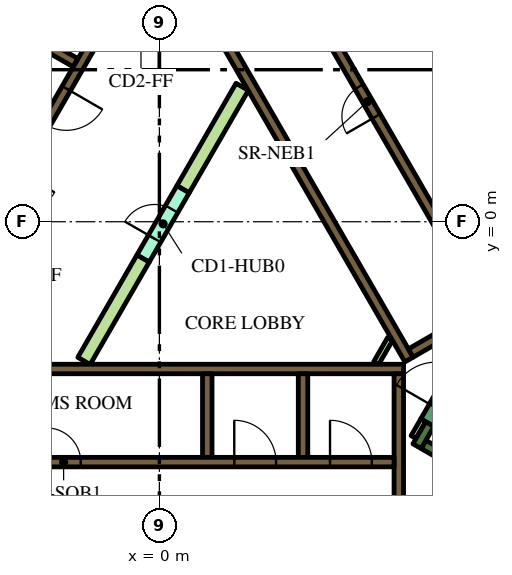
"""IFC4 building model, lengths in metres.
Left out: names, types, materials, properties, quantities, classifications, styles, units other than length and angle.
Written with IfcOpenShell. Run it as: python <this file> out.ifc"""

import sys

from ifc_helpers import new_model, si_unit, direction, frame, frame_2d, origin, place, context, subcontext, project, spatial, polyline, rectangle, outline, extrude, element, fill, save


model = new_model("IFC4")
c1 = context("Model", 3, precision=1e-05, world=origin(), true_north=direction((0.0, 1.0)))
c2 = subcontext(c1, "Body", "Model", "MODEL_VIEW")
j1 = project(units=[si_unit("LENGTHUNIT", "METRE"), si_unit("PLANEANGLEUNIT", "RADIAN")], contexts=[c1])
p1 = place(None, origin())
s1 = spatial("IfcSite", under=j1, at=p1, CompositionType="ELEMENT")
p2 = place(p1, origin())
s2 = spatial("IfcBuilding", under=s1, at=p2, CompositionType="ELEMENT")
p3 = place(p2, frame((0.0, 0.0, 103.2)))
s3 = spatial("IfcBuildingStorey", under=s2, at=p3, CompositionType="ELEMENT", Elevation=103.2)
p4 = place(p3, frame((6.711, 13.476, 0.0), z_axis=(0.0, 0.0, 1.0), x_axis=(0.500002723396, -0.866023831425, 0.0)))
e1 = element("IfcWall", 1, at=p4, inside=s3, PredefinedType="SOLIDWALL", context=c2, shape_type="SweptSolid", body=[
    extrude(rectangle(XDim=20.334, YDim=0.9, at=frame_2d((10.167, 0.0))), origin(), (0.0, 0.0, 1.0), 3.9),
])
p5 = place(p3, frame((12.84, -9.261, 0.0), z_axis=(0.0, 0.0, 1.0), x_axis=(-0.866013990052, 0.500019768644, 0.0)))
e2 = element("IfcWall", 2, at=p5, inside=s3, PredefinedType="SOLIDWALL", context=c2, shape_type="SweptSolid", body=[
    extrude(rectangle(XDim=6.8, YDim=0.25, at=frame_2d((3.4, 0.0))), origin(), (0.0, 0.0, 1.0), 3.9),
])
p6 = place(p3, frame((6.78, -5.906, 0.0), z_axis=(0.0, 0.0, 1.0), x_axis=(0.500223362819, 0.865896406789, 0.0)))
e3 = element("IfcWall", 3, at=p6, inside=s3, PredefinedType="SOLIDWALL", context=c2, shape_type="SweptSolid", body=[
    extrude(rectangle(XDim=0.675, YDim=0.25, at=frame_2d((0.337, 0.0))), origin(), (0.0, 0.0, 1.0), 3.9),
])
p7 = place(p3, frame((-5.545, -3.875, 0.0), z_axis=(0.0, 0.0, 1.0), x_axis=(1.0, 0.0, 0.0)))
e4 = element("IfcWall", 4, at=p7, inside=s3, PredefinedType="SOLIDWALL", context=c2, shape_type="SweptSolid", body=[
    extrude(rectangle(XDim=11.97, YDim=0.25, at=frame_2d((5.985, 0.0))), origin(), (0.0, 0.0, 1.0), 3.9),
])
p8 = place(p3, frame((6.3, -7.268, 0.0), z_axis=(0.0, 0.0, 1.0), x_axis=(0.0, 1.0, 0.0)))
e5 = element("IfcWall", 5, at=p8, inside=s3, PredefinedType="SOLIDWALL", context=c2, shape_type="SweptSolid", body=[
    extrude(rectangle(XDim=3.268, YDim=0.25, at=frame_2d((1.634, 0.0))), origin(), (0.0, 0.0, 1.0), 3.9),
])
for number, where, z_axis, x_axis in (
    (6, (3.78, -4.0, 0.0), (0.0, 0.0, 1.0), (0.0, -1.0, 0.0)),
    (7, (1.26, -4.0, 0.0), (0.0, 0.0, 1.0), (0.0, -1.0, 0.0)),
):
    element("IfcWall", number, at=place(p3, frame(where, z_axis=z_axis, x_axis=x_axis)), inside=s3, PredefinedType="SOLIDWALL", context=c2, shape_type="SweptSolid", body=[
        extrude(rectangle(XDim=2.2, YDim=0.25, at=frame_2d((1.1, 0.0))), origin(), (0.0, 0.0, 1.0), 3.9),
    ])
p9 = place(p3, origin())
e8 = element("IfcWall", 8, at=p9, inside=s3, PredefinedType="SOLIDWALL", context=c2, shape_type="SweptSolid", body=[
    extrude(outline(polyline([(0.566, 6.725), (0.566, 6.875), (0.566, 6.875), (0.565, 6.875), (0.361, 6.875), (0.035, 7.439), (0.252, 7.564), (0.377, 7.348), (6.552, -3.348), (6.677, -3.564), (6.46, -3.689), (0.448, 6.725), (0.565, 6.725), (0.566, 6.725), (0.566, 6.725)])), origin(), (0.0, 0.0, 1.0), 3.9),
])
p10 = place(p3, frame((6.614, -3.456, 0.0), z_axis=(0.0, 0.0, 1.0), x_axis=(0.86602447079, 0.500001615989, 0.0)))
e9 = element("IfcWall", 9, at=p10, inside=s3, PredefinedType="SOLIDWALL", context=c2, shape_type="SweptSolid", body=[
    extrude(rectangle(XDim=3.154, YDim=0.25, at=frame_2d((1.577, 0.0))), origin(), (0.0, 0.0, 1.0), 3.9),
])
p11 = place(p3, frame((-8.06, -1.311, 0.0), z_axis=(0.0, 0.0, 1.0), x_axis=(0.50000273126, 0.866023826885, 0.0)))
e10 = element("IfcWall", 10, at=p11, inside=s3, PredefinedType="SOLIDWALL", context=c2, shape_type="SweptSolid", body=[
    extrude(rectangle(XDim=10.33, YDim=0.25, at=frame_2d((5.165, 0.0))), origin(), (0.0, 0.0, 1.0), 3.9),
])
p12 = place(p3, frame((-2.204, 4.182, 0.0), z_axis=(0.0, 0.0, 1.0), x_axis=(-0.866008176907, 0.50002983664, 0.0)))
e11 = element("IfcWall", 11, at=p12, inside=s3, PredefinedType="SOLIDWALL", context=c2, shape_type="SweptSolid", body=[
    extrude(rectangle(XDim=2.2, YDim=0.25, at=frame_2d((1.1, 0.0))), origin(), (0.0, 0.0, 1.0), 3.9),
])
p13 = place(p3, frame((6.945, -5.222, 0.0), z_axis=(0.0, 0.0, 1.0), x_axis=(-0.499818422106, -0.866130212453, 0.0)))
e12 = element("IfcWall", 12, at=p13, inside=s3, PredefinedType="PARTITIONING", context=c2, shape_type="SweptSolid", body=[
    extrude(rectangle(XDim=0.514, YDim=0.15, at=frame_2d((0.257, 0.0))), origin(), (0.0, 0.0, 1.0), 2.75),
])
p14 = place(p3, frame((5.705, -3.718, 0.0), z_axis=(0.0, 0.0, 1.0), x_axis=(0.499962090823, 0.866047289552, 0.0)))
e13 = element("IfcWall", 13, at=p14, inside=s3, PredefinedType="PARTITIONING", context=c2, shape_type="SweptSolid", body=[
    extrude(rectangle(XDim=0.735, YDim=0.15, at=frame_2d((0.367, 0.0))), origin(), (0.0, 0.0, 1.0), 2.75),
])
e14 = element("IfcWall", 14, at=p9, inside=s3, PredefinedType="PARTITIONING", context=c2, shape_type="SweptSolid", body=[
    extrude(outline(polyline([(-0.59, -0.872), (-0.265, -1.059), (-1.822, -3.756), (-2.147, -3.568), (-0.59, -0.872)])), origin(), (0.0, 0.0, 1.0), 2.75),
])
e15 = element("IfcWall", 15, at=p9, inside=s3, PredefinedType="PARTITIONING", context=c2, shape_type="SweptSolid", body=[
    extrude(outline(polyline([(2.017, 3.643), (2.342, 3.456), (0.785, 0.76), (0.46, 0.947), (2.017, 3.643)])), origin(), (0.0, 0.0, 1.0), 2.75),
])
p15 = place(p3, frame((-6.175, -6.325, 0.0), z_axis=(0.0, 0.0, 1.0), x_axis=(1.0, 0.0, 0.0)))
e16 = element("IfcWall", 16, at=p15, inside=s3, PredefinedType="SOLIDWALL", context=c2, shape_type="SweptSolid", body=[
    extrude(rectangle(XDim=12.35, YDim=0.25, at=frame_2d((6.175, 0.0))), origin(), (0.0, 0.0, 1.0), 3.9),
])
p16 = place(p15, frame((3.205, 0.0, 0.0)))
e17 = element("IfcOpeningElement", 17, at=p16, cuts=e16, PredefinedType="OPENING", context=c2, shape_type="SweptSolid", body=[
    extrude(rectangle(XDim=0.9, YDim=2.1, at=frame_2d((0.45, 1.05))), frame((0.0, 0.135, 0.0), z_axis=(0.0, -1.0, 0.0), x_axis=(1.0, 0.0, 0.0)), (0.0, 0.0, 1.0), 0.27),
])
p17 = place(p15, frame((8.145, 0.0, 0.0)))
e18 = element("IfcOpeningElement", 18, at=p17, cuts=e16, PredefinedType="OPENING", context=c2, shape_type="SweptSolid", body=[
    extrude(rectangle(XDim=1.1, YDim=2.1, at=frame_2d((0.55, 1.05))), frame((0.0, 0.135, 0.0), z_axis=(0.0, -1.0, 0.0), x_axis=(1.0, 0.0, 0.0)), (0.0, 0.0, 1.0), 0.27),
])
p18 = place(p15, frame((10.665, 0.0, 0.0)))
e19 = element("IfcOpeningElement", 19, at=p18, cuts=e16, PredefinedType="OPENING", context=c2, shape_type="SweptSolid", body=[
    extrude(rectangle(XDim=1.1, YDim=2.1, at=frame_2d((0.55, 1.05))), frame((0.0, 0.135, 0.0), z_axis=(0.0, -1.0, 0.0), x_axis=(1.0, 0.0, 0.0)), (0.0, 0.0, 1.0), 0.27),
])
p19 = place(p3, frame((11.553, -0.46, 0.0), z_axis=(0.0, 0.0, 1.0), x_axis=(-0.500006514828, 0.866021642414, 0.0)))
e20 = element("IfcWall", 20, at=p19, inside=s3, PredefinedType="SOLIDWALL", context=c2, shape_type="SweptSolid", body=[
    extrude(rectangle(XDim=12.35, YDim=0.25, at=frame_2d((6.175, 0.0))), origin(), (0.0, 0.0, 1.0), 3.9),
])
p20 = place(p19, frame((0.585, 0.0, 0.0)))
e21 = element("IfcOpeningElement", 21, at=p20, cuts=e20, PredefinedType="OPENING", context=c2, shape_type="SweptSolid", body=[
    extrude(rectangle(XDim=1.1, YDim=2.1, at=frame_2d((0.55, 1.05))), frame((0.0, 0.135, 0.0), z_axis=(0.0, -1.0, 0.0), x_axis=(1.0, 0.0, 0.0)), (0.0, 0.0, 1.0), 0.27),
])
p21 = place(p19, frame((3.105, 0.0, 0.0)))
e22 = element("IfcOpeningElement", 22, at=p21, cuts=e20, PredefinedType="OPENING", context=c2, shape_type="SweptSolid", body=[
    extrude(rectangle(XDim=1.1, YDim=2.1, at=frame_2d((0.55, 1.05))), frame((0.0, 0.135, 0.0), z_axis=(0.0, -1.0, 0.0), x_axis=(1.0, 0.0, 0.0)), (0.0, 0.0, 1.0), 0.27),
])
p22 = place(p19, frame((5.625, 0.0, 0.0)))
e23 = element("IfcOpeningElement", 23, at=p22, cuts=e20, PredefinedType="OPENING", context=c2, shape_type="SweptSolid", body=[
    extrude(rectangle(XDim=1.1, YDim=2.1, at=frame_2d((0.55, 1.05))), frame((0.0, 0.135, 0.0), z_axis=(0.0, -1.0, 0.0), x_axis=(1.0, 0.0, 0.0)), (0.0, 0.0, 1.0), 0.27),
])
p23 = place(p3, frame((8.565, -2.185, 0.0), z_axis=(0.0, 0.0, 1.0), x_axis=(-0.499997954832, 0.866026584559, 0.0)))
e24 = element("IfcWall", 24, at=p23, inside=s3, PredefinedType="SOLIDWALL", context=c2, shape_type="SweptSolid", body=[
    extrude(rectangle(XDim=12.35, YDim=0.25, at=frame_2d((6.175, 0.0))), origin(), (0.0, 0.0, 1.0), 3.9),
])
p24 = place(p23, frame((5.725, 0.0, 0.0)))
e25 = element("IfcOpeningElement", 25, at=p24, cuts=e24, PredefinedType="OPENING", context=c2, shape_type="SweptSolid", body=[
    extrude(rectangle(XDim=0.9, YDim=2.1, at=frame_2d((0.45, 1.05))), frame((0.0, 0.135, 0.0), z_axis=(0.0, -1.0, 0.0), x_axis=(1.0, 0.0, 0.0)), (0.0, 0.0, 1.0), 0.27),
])
p25 = place(p3, frame((-0.898, 6.194, 0.0), z_axis=(0.0, 0.0, 1.0), x_axis=(-0.499996202215, -0.866027596426, 0.0)))
e26 = element("IfcWall", 26, at=p25, inside=s3, PredefinedType="SOLIDWALL", context=c2, shape_type="SweptSolid", body=[
    extrude(rectangle(XDim=9.83, YDim=0.25, at=frame_2d((4.915, 0.0))), origin(), (0.0, 0.0, 1.0), 3.9),
])
p26 = place(p25, frame((0.585, 0.0, 0.0)))
e27 = element("IfcOpeningElement", 27, at=p26, cuts=e26, PredefinedType="OPENING", context=c2, shape_type="SweptSolid", body=[
    extrude(rectangle(XDim=1.1, YDim=2.1, at=frame_2d((0.55, 1.05))), frame((0.0, 0.135, 0.0), z_axis=(0.0, -1.0, 0.0), x_axis=(1.0, 0.0, 0.0)), (0.0, 0.0, 1.0), 0.27),
])
p27 = place(p25, frame((3.105, 0.0, 0.0)))
e28 = element("IfcOpeningElement", 28, at=p27, cuts=e26, PredefinedType="OPENING", context=c2, shape_type="SweptSolid", body=[
    extrude(rectangle(XDim=1.1, YDim=2.1, at=frame_2d((0.55, 1.05))), frame((0.0, 0.135, 0.0), z_axis=(0.0, -1.0, 0.0), x_axis=(1.0, 0.0, 0.0)), (0.0, 0.0, 1.0), 0.27),
])
p28 = place(p25, frame((5.625, 0.0, 0.0)))
e29 = element("IfcOpeningElement", 29, at=p28, cuts=e26, PredefinedType="OPENING", context=c2, shape_type="SweptSolid", body=[
    extrude(rectangle(XDim=1.1, YDim=2.1, at=frame_2d((0.55, 1.05))), frame((0.0, 0.135, 0.0), z_axis=(0.0, -1.0, 0.0), x_axis=(1.0, 0.0, 0.0)), (0.0, 0.0, 1.0), 0.27),
])
p29 = place(p25, frame((8.145, 0.0, 0.0)))
e30 = element("IfcOpeningElement", 30, at=p29, cuts=e26, PredefinedType="OPENING", context=c2, shape_type="SweptSolid", body=[
    extrude(rectangle(XDim=1.1, YDim=2.1, at=frame_2d((0.55, 1.05))), frame((0.0, 0.135, 0.0), z_axis=(0.0, -1.0, 0.0), x_axis=(1.0, 0.0, 0.0)), (0.0, 0.0, 1.0), 0.27),
])
p30 = place(p3, frame((7.053, -5.284, 0.0), z_axis=(0.0, 0.0, 1.0), x_axis=(0.500078061341, 0.865980330357, 0.0)))
e31 = element("IfcWall", 31, at=p30, inside=s3, PredefinedType="SOLIDWALL", context=c2, shape_type="SweptSolid", body=[
    extrude(rectangle(XDim=2.1, YDim=0.4, at=frame_2d((1.05, 0.0))), origin(), (0.0, 0.0, 1.0), 3.9),
])
p31 = place(p30, frame((0.45, 0.0, 0.0)))
e32 = element("IfcOpeningElement", 32, at=p31, cuts=e31, PredefinedType="OPENING", context=c2, shape_type="SweptSolid", body=[
    extrude(rectangle(XDim=1.2, YDim=2.1, at=frame_2d((0.6, 1.05))), frame((0.0, 0.21, 0.0), z_axis=(0.0, -1.0, 0.0), x_axis=(1.0, 0.0, 0.0)), (0.0, 0.0, 1.0), 0.42),
])
p32 = place(p3, frame((-0.427, -0.966, 0.0), z_axis=(0.0, 0.0, 1.0), x_axis=(0.49994051562, 0.866059744384, 0.0)))
e33 = element("IfcWall", 33, at=p32, inside=s3, PredefinedType="PARTITIONING", context=c2, shape_type="SweptSolid", body=[
    extrude(rectangle(XDim=2.1, YDim=0.375, at=frame_2d((1.05, 0.0))), origin(), (0.0, 0.0, 1.0), 2.75),
])
p33 = place(p32, frame((0.6, 0.0, 0.0)))
e34 = element("IfcOpeningElement", 34, at=p33, cuts=e33, PredefinedType="OPENING", context=c2, shape_type="SweptSolid", body=[
    extrude(rectangle(XDim=0.9, YDim=2.1, at=frame_2d((0.45, 1.05))), frame((0.0, 0.198, 0.0), z_axis=(0.0, -1.0, 0.0), x_axis=(1.0, 0.0, 0.0)), (0.0, 0.0, 1.0), 0.395),
])
p34 = place(p3, frame((6.163, 18.475, 0.0), z_axis=(0.0, 0.0, 1.0), x_axis=(0.500001317485, -0.866024643133, 0.0)))
e35 = element("IfcWall", 35, at=p34, inside=s3, PredefinedType="PARTITIONING", context=c2, shape_type="SweptSolid", body=[
    extrude(rectangle(XDim=25.767, YDim=0.15, at=frame_2d((12.883, 0.0))), origin(), (0.0, 0.0, 1.0), 2.75),
])
p35 = place(p34, frame((24.241, 0.0, 0.0)))
e36 = element("IfcOpeningElement", 36, at=p35, cuts=e35, PredefinedType="OPENING", context=c2, shape_type="SweptSolid", body=[
    extrude(rectangle(XDim=1.0, YDim=2.1, at=frame_2d((0.5, 1.05))), frame((0.0, 0.085, 0.0), z_axis=(0.0, -1.0, 0.0), x_axis=(1.0, 0.0, 0.0)), (0.0, 0.0, 1.0), 0.17),
])
p36 = place(p34, frame((13.144, 0.0, 0.0)))
e37 = element("IfcOpeningElement", 37, at=p36, cuts=e35, PredefinedType="OPENING", context=c2, shape_type="SweptSolid", body=[
    extrude(rectangle(XDim=1.0, YDim=2.1, at=frame_2d((0.5, 1.05))), frame((0.0, 0.085, 0.0), z_axis=(0.0, -1.0, 0.0), x_axis=(1.0, 0.0, 0.0)), (0.0, 0.0, 1.0), 0.17),
])
p37 = place(p34, frame((11.592, 0.0, 0.0)))
e38 = element("IfcOpeningElement", 38, at=p37, cuts=e35, PredefinedType="OPENING", context=c2, shape_type="SweptSolid", body=[
    extrude(rectangle(XDim=1.1, YDim=2.1, at=frame_2d((0.55, 1.05))), frame((0.0, 0.085, 0.0), z_axis=(0.0, -1.0, 0.0), x_axis=(1.0, 0.0, 0.0)), (0.0, 0.0, 1.0), 0.17),
])
p38 = place(p34, frame((4.674, 0.0, 0.0)))
e39 = element("IfcOpeningElement", 39, at=p38, cuts=e35, PredefinedType="OPENING", context=c2, shape_type="SweptSolid", body=[
    extrude(rectangle(XDim=0.9, YDim=2.1, at=frame_2d((0.45, 1.05))), frame((0.0, 0.085, 0.0), z_axis=(0.0, -1.0, 0.0), x_axis=(1.0, 0.0, 0.0)), (0.0, 0.0, 1.0), 0.17),
])
p39 = place(p34, frame((2.411, 0.0, 0.0)))
e40 = element("IfcOpeningElement", 40, at=p39, cuts=e35, PredefinedType="OPENING", context=c2, shape_type="SweptSolid", body=[
    extrude(rectangle(XDim=1.0, YDim=2.1, at=frame_2d((0.5, 1.05))), frame((0.0, 0.085, 0.0), z_axis=(0.0, -1.0, 0.0), x_axis=(1.0, 0.0, 0.0)), (0.0, 0.0, 1.0), 0.17),
])
p40 = place(p16, origin())
e41 = element("IfcDoor", 41, at=p40, inside=s3, OperationType="SINGLE_SWING_LEFT", PredefinedType="DOOR", context=c2, shape_type="SweptSolid", body=[
    extrude(rectangle(XDim=0.9, YDim=2.1, at=frame_2d((0.45, 1.05))), frame((0.0, 0.025, 0.0), z_axis=(0.0, -1.0, 0.0), x_axis=(1.0, 0.0, 0.0)), (0.0, 0.0, 1.0), 0.05),
])
fill(e17, e41)
p41 = place(p17, origin())
e42 = element("IfcDoor", 42, at=p41, inside=s3, OperationType="DOUBLE_DOOR_SLIDING", PredefinedType="DOOR", context=c2, shape_type="SweptSolid", body=[
    extrude(rectangle(XDim=1.1, YDim=2.1, at=frame_2d((0.55, 1.05))), frame((0.0, 0.025, 0.0), z_axis=(0.0, -1.0, 0.0), x_axis=(1.0, 0.0, 0.0)), (0.0, 0.0, 1.0), 0.05),
])
fill(e18, e42)
p42 = place(p18, origin())
e43 = element("IfcDoor", 43, at=p42, inside=s3, OperationType="DOUBLE_DOOR_SLIDING", PredefinedType="DOOR", context=c2, shape_type="SweptSolid", body=[
    extrude(rectangle(XDim=1.1, YDim=2.1, at=frame_2d((0.55, 1.05))), frame((0.0, 0.025, 0.0), z_axis=(0.0, -1.0, 0.0), x_axis=(1.0, 0.0, 0.0)), (0.0, 0.0, 1.0), 0.05),
])
fill(e19, e43)
p43 = place(p24, origin())
e44 = element("IfcDoor", 44, at=p43, inside=s3, OperationType="SINGLE_SWING_LEFT", PredefinedType="DOOR", context=c2, shape_type="SweptSolid", body=[
    extrude(rectangle(XDim=0.9, YDim=2.1, at=frame_2d((0.45, 1.05))), frame((0.0, 0.025, 0.0), z_axis=(0.0, -1.0, 0.0), x_axis=(1.0, 0.0, 0.0)), (0.0, 0.0, 1.0), 0.05),
])
fill(e25, e44)
p44 = place(p27, origin())
e45 = element("IfcDoor", 45, at=p44, inside=s3, OperationType="DOUBLE_DOOR_SLIDING", PredefinedType="DOOR", context=c2, shape_type="SweptSolid", body=[
    extrude(rectangle(XDim=1.1, YDim=2.1, at=frame_2d((0.55, 1.05))), frame((0.0, 0.025, 0.0), z_axis=(0.0, -1.0, 0.0), x_axis=(1.0, 0.0, 0.0)), (0.0, 0.0, 1.0), 0.05),
])
fill(e28, e45)
p45 = place(p33, origin())
e46 = element("IfcDoor", 46, at=p45, inside=s3, OperationType="SINGLE_SWING_LEFT", PredefinedType="DOOR", context=c2, shape_type="SweptSolid", body=[
    extrude(rectangle(XDim=0.9, YDim=2.1, at=frame_2d((0.45, 1.05))), frame((0.0, 0.025, 0.0), z_axis=(0.0, -1.0, 0.0), x_axis=(1.0, 0.0, 0.0)), (0.0, 0.0, 1.0), 0.05),
])
fill(e34, e46)
save(model, sys.argv[1])
